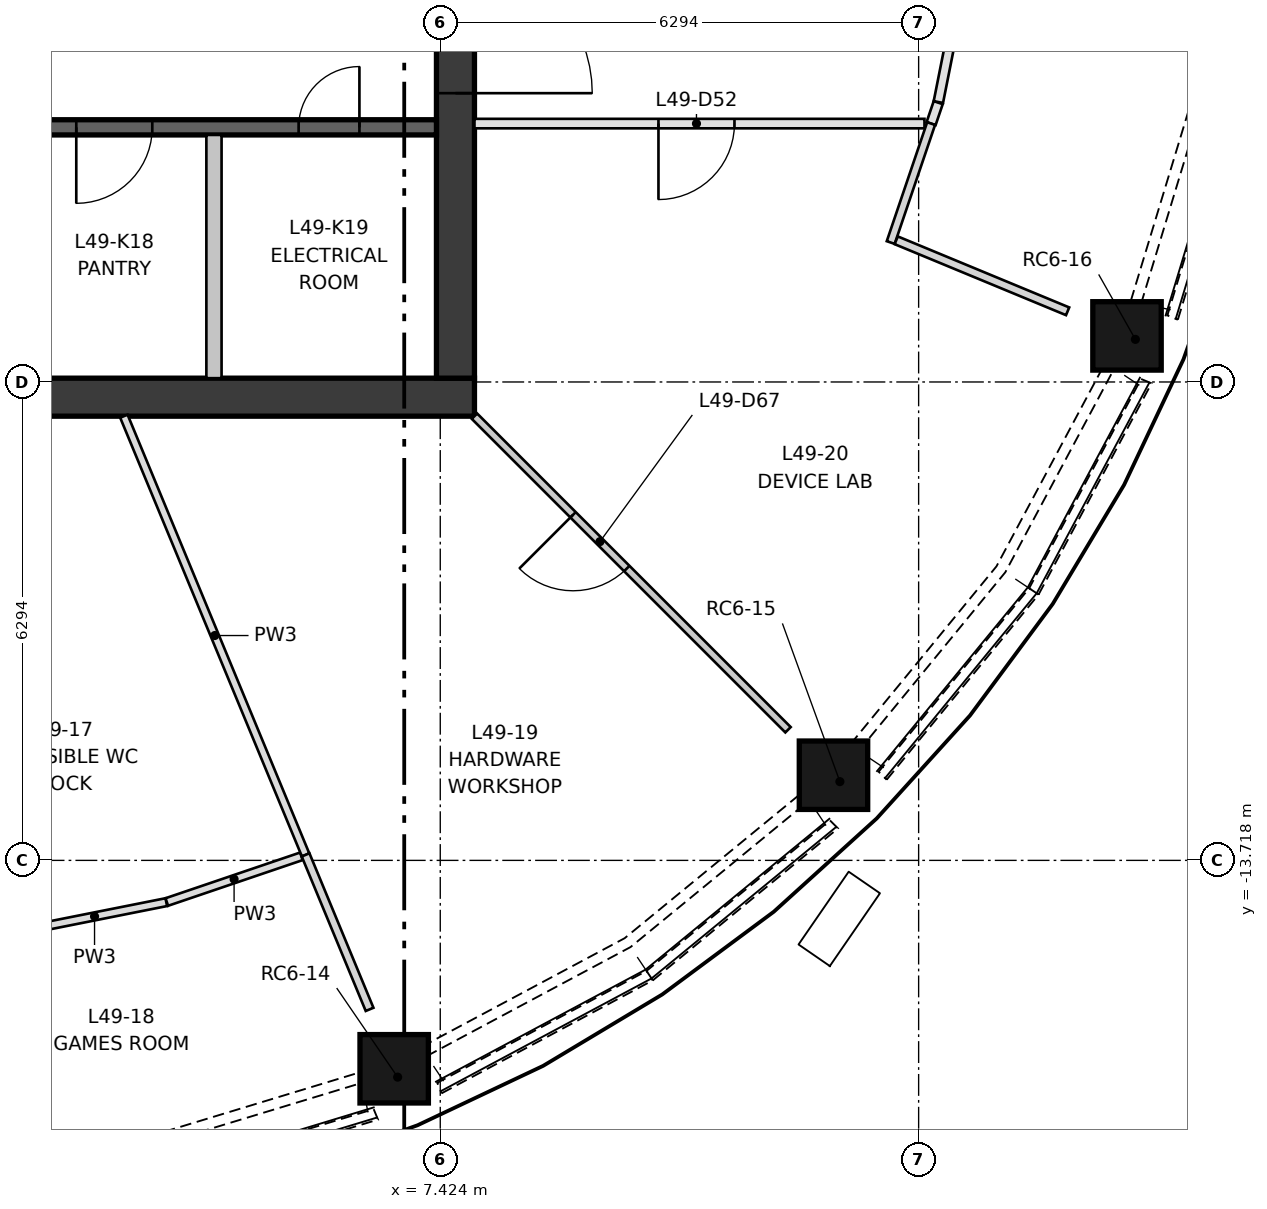
"""IFC4 building model, lengths in metres.
Left out: names, types, materials, properties, quantities, classifications, styles, units other than length and angle.
Written with IfcOpenShell. Run it as: python <this file> out.ifc"""

import sys

from ifc_helpers import new_model, si_unit, direction, frame, frame_2d, origin, origin_2d, place, context, subcontext, project, spatial, polyline, rectangle, outline, extrude, element, fill, save


model = new_model("IFC4")
c1 = context("Model", 3, precision=1e-05, world=origin(), true_north=direction((0.0, 1.0)))
c2 = subcontext(c1, "Body", "Model", "MODEL_VIEW")
j1 = project(units=[si_unit("LENGTHUNIT", "METRE"), si_unit("PLANEANGLEUNIT", "RADIAN")], contexts=[c1])
p1 = place(None, origin())
s1 = spatial("IfcSite", under=j1, at=p1, CompositionType="ELEMENT")
p2 = place(p1, origin())
s2 = spatial("IfcBuilding", under=s1, at=p2, CompositionType="ELEMENT")
p3 = place(p2, frame((0.0, 0.0, 184.3)))
s3 = spatial("IfcBuildingStorey", under=s2, at=p3, CompositionType="ELEMENT", Elevation=184.3)
p4 = place(p3, frame((6.863, -16.57, 0.5), z_axis=(0.0, 0.0, 1.0), x_axis=(-0.924120904221, -0.382100188932, 0.0)))
e1 = element("IfcColumn", 1, at=p4, inside=s3, PredefinedType="COLUMN", context=c2, shape_type="SweptSolid", body=[
    extrude(rectangle(XDim=0.9, YDim=0.9, at=origin_2d()), origin(), (0.0, -0.168, 0.986), 2.384),
])
p5 = place(p3, frame((12.682, -12.682, 0.5), z_axis=(0.0, 0.0, 1.0), x_axis=(-0.707106781187, -0.707106781187, 0.0)))
e2 = element("IfcColumn", 2, at=p5, inside=s3, PredefinedType="COLUMN", context=c2, shape_type="SweptSolid", body=[
    extrude(rectangle(XDim=0.9, YDim=0.9, at=origin_2d()), origin(), (0.0, -0.168, 0.986), 2.384),
])
p6 = place(p3, frame((16.57, -6.863, 0.5), z_axis=(0.0, 0.0, 1.0), x_axis=(-0.382100188932, -0.924120904221, 0.0)))
e3 = element("IfcColumn", 3, at=p6, inside=s3, PredefinedType="COLUMN", context=c2, shape_type="SweptSolid", body=[
    extrude(rectangle(XDim=0.9, YDim=0.9, at=origin_2d()), origin(), (0.0, -0.168, 0.986), 2.384),
])
p7 = place(p3, frame((-7.874, -7.624, 0.0), z_axis=(0.0, 0.0, 1.0), x_axis=(1.0, 0.0, 0.0)))
e4 = element("IfcWall", 4, at=p7, inside=s3, PredefinedType="SHEAR", context=c2, shape_type="SweptSolid", body=[
    extrude(rectangle(XDim=15.748, YDim=0.5, at=frame_2d((7.874, 0.0))), origin(), (0.0, 0.0, 1.0), 3.35),
])
p8 = place(p3, frame((7.624, -7.374, 0.0), z_axis=(0.0, 0.0, 1.0), x_axis=(0.0, 1.0, 0.0)))
e5 = element("IfcWall", 5, at=p8, inside=s3, PredefinedType="SHEAR", context=c2, shape_type="SweptSolid", body=[
    extrude(rectangle(XDim=14.748, YDim=0.5, at=frame_2d((7.374, 0.0))), origin(), (0.0, 0.0, 1.0), 3.35),
])
p9 = place(p8, frame((6.874, 0.0, 0.0)))
e6 = element("IfcOpeningElement", 6, at=p9, cuts=e5, PredefinedType="OPENING", context=c2, shape_type="SweptSolid", body=[
    extrude(rectangle(XDim=1.0, YDim=2.1, at=frame_2d((0.5, 1.05))), frame((0.0, 0.26, 0.0), z_axis=(0.0, -1.0, 0.0), x_axis=(1.0, 0.0, 0.0)), (0.0, 0.0, 1.0), 0.52),
])
p10 = place(p8, frame((3.75, 0.0, 0.0)))
e7 = element("IfcOpeningElement", 7, at=p10, cuts=e5, PredefinedType="OPENING", context=c2, shape_type="SweptSolid", body=[
    extrude(rectangle(XDim=1.8, YDim=2.1, at=frame_2d((0.9, 1.05))), frame((0.0, 0.26, 0.0), z_axis=(0.0, -1.0, 0.0), x_axis=(1.0, 0.0, 0.0)), (0.0, 0.0, 1.0), 0.52),
])
p11 = place(p8, frame((9.198, 0.0, 0.0)))
e8 = element("IfcOpeningElement", 8, at=p11, cuts=e5, PredefinedType="OPENING", context=c2, shape_type="SweptSolid", body=[
    extrude(rectangle(XDim=1.8, YDim=2.1, at=frame_2d((0.9, 1.05))), frame((0.0, 0.26, 0.0), z_axis=(0.0, -1.0, 0.0), x_axis=(1.0, 0.0, 0.0)), (0.0, 0.0, 1.0), 0.52),
])
p12 = place(p3, frame((-7.374, -4.074, 0.0), z_axis=(0.0, 0.0, 1.0), x_axis=(1.0, 0.0, 0.0)))
e9 = element("IfcWall", 9, at=p12, inside=s3, PredefinedType="SHEAR", context=c2, shape_type="SweptSolid", body=[
    extrude(rectangle(XDim=14.748, YDim=0.2, at=frame_2d((7.374, 0.0))), origin(), (0.0, 0.0, 1.0), 3.0),
])
p13 = place(p12, frame((1.319, 0.0, 0.0)))
e10 = element("IfcOpeningElement", 10, at=p13, cuts=e9, PredefinedType="OPENING", context=c2, shape_type="SweptSolid", body=[
    extrude(rectangle(XDim=1.1, YDim=2.1, at=frame_2d((0.55, 1.05))), frame((0.0, 0.11, 0.0), z_axis=(0.0, -1.0, 0.0), x_axis=(1.0, 0.0, 0.0)), (0.0, 0.0, 1.0), 0.22),
])
p14 = place(p12, frame((4.456, 0.0, 0.0)))
e11 = element("IfcOpeningElement", 11, at=p14, cuts=e9, PredefinedType="OPENING", context=c2, shape_type="SweptSolid", body=[
    extrude(rectangle(XDim=1.1, YDim=2.1, at=frame_2d((0.55, 1.05))), frame((0.0, 0.11, 0.0), z_axis=(0.0, -1.0, 0.0), x_axis=(1.0, 0.0, 0.0)), (0.0, 0.0, 1.0), 0.22),
])
p15 = place(p12, frame((7.386, 0.0, 0.0)))
e12 = element("IfcOpeningElement", 12, at=p15, cuts=e9, PredefinedType="OPENING", context=c2, shape_type="SweptSolid", body=[
    extrude(rectangle(XDim=1.0, YDim=2.1, at=frame_2d((0.5, 1.05))), frame((0.0, 0.11, 0.0), z_axis=(0.0, -1.0, 0.0), x_axis=(1.0, 0.0, 0.0)), (0.0, 0.0, 1.0), 0.22),
])
p16 = place(p12, frame((10.009, 0.0, 0.0)))
e13 = element("IfcOpeningElement", 13, at=p16, cuts=e9, PredefinedType="OPENING", context=c2, shape_type="SweptSolid", body=[
    extrude(rectangle(XDim=1.0, YDim=2.1, at=frame_2d((0.5, 1.05))), frame((0.0, 0.11, 0.0), z_axis=(0.0, -1.0, 0.0), x_axis=(1.0, 0.0, 0.0)), (0.0, 0.0, 1.0), 0.22),
])
p17 = place(p12, frame((12.934, 0.0, 0.0)))
e14 = element("IfcOpeningElement", 14, at=p17, cuts=e9, PredefinedType="OPENING", context=c2, shape_type="SweptSolid", body=[
    extrude(rectangle(XDim=0.8, YDim=2.1, at=frame_2d((0.4, 1.05))), frame((0.0, 0.11, 0.0), z_axis=(0.0, -1.0, 0.0), x_axis=(1.0, 0.0, 0.0)), (0.0, 0.0, 1.0), 0.22),
])
p18 = place(p3, frame((4.447, -7.374, 0.0), z_axis=(0.0, 0.0, 1.0), x_axis=(0.0, 1.0, 0.0)))
e15 = element("IfcWall", 15, at=p18, inside=s3, PredefinedType="PARTITIONING", context=c2, shape_type="SweptSolid", body=[
    extrude(rectangle(XDim=3.2, YDim=0.2, at=frame_2d((1.6, 0.0))), origin(), (0.0, 0.0, 1.0), 3.0),
])
p19 = place(p3, frame((3.59, -18.043, 0.0), z_axis=(0.286418531815, -0.944194299341, 0.162670064008), x_axis=(0.956940039415, 0.290285654048, 4.29464e-06)))
e16 = element("IfcWall", 16, at=p19, inside=s3, PredefinedType="SOLIDWALL", context=c2, shape_type="SweptSolid", body=[
    extrude(outline(polyline([(0.0, 0.0), (3.151, 5.551e-17), (3.137, 0.912), (0.014, 0.912), (0.0, 0.0)])), origin(), (0.0, 0.0, -1.0), 0.3),
])
p20 = place(p3, frame((7.441, -16.782, 0.0), z_axis=(0.465338838382, -0.870053087177, 0.162688017342), x_axis=(0.881801348468, 0.471621015005, -6.731272e-06)))
e17 = element("IfcWall", 17, at=p20, inside=s3, PredefinedType="SOLIDWALL", context=c2, shape_type="SweptSolid", body=[
    extrude(outline(polyline([(0.0, 0.0), (3.152, 2.776e-17), (3.137, 0.912), (0.015, 0.912), (0.0, 0.0)])), origin(), (0.0, 0.0, -1.0), 0.3),
])
p21 = place(p3, frame((10.221, -15.296, 0.0), z_axis=(0.625791219471, -0.762829436571, 0.162716318582), x_axis=(0.773132385109, 0.634244680745, 6.479811e-06)))
e18 = element("IfcWall", 18, at=p21, inside=s3, PredefinedType="SOLIDWALL", context=c2, shape_type="SweptSolid", body=[
    extrude(outline(polyline([(0.0, 0.0), (3.151, 0.0), (3.137, 0.912), (0.014, 0.912), (0.0, 0.0)])), origin(), (0.0, 0.0, -1.0), 0.3),
])
p22 = place(p3, frame((13.297, -12.657, 0.0), z_axis=(0.762803450932, -0.625801401555, 0.162798959018), x_axis=(0.634263258583, 0.773117144297, -2.518315e-06)))
e19 = element("IfcWall", 19, at=p22, inside=s3, PredefinedType="SOLIDWALL", context=c2, shape_type="SweptSolid", body=[
    extrude(outline(polyline([(0.0, 0.0), (3.151, 5.551e-17), (3.137, 0.912), (0.015, 0.912), (0.0, 0.0)])), origin(), (0.0, 0.0, -1.0), 0.3),
])
p23 = place(p3, frame((15.296, -10.221, 0.0), z_axis=(0.870053087177, -0.465338838382, 0.162688017342), x_axis=(0.471621015005, 0.881801348468, 6.731272e-06)))
e20 = element("IfcWall", 20, at=p23, inside=s3, PredefinedType="SOLIDWALL", context=c2, shape_type="SweptSolid", body=[
    extrude(outline(polyline([(0.0, 0.0), (3.152, -2.776e-17), (3.137, 0.912), (0.015, 0.912), (0.0, 0.0)])), origin(), (0.0, 0.0, -1.0), 0.3),
])
p24 = place(p3, frame((17.128, -6.605, 0.0), z_axis=(0.94416395345, -0.286447724297, 0.162794748846), x_axis=(0.290320348038, 0.956929514391, 1.683956e-06)))
e21 = element("IfcWall", 21, at=p24, inside=s3, PredefinedType="SOLIDWALL", context=c2, shape_type="SweptSolid", body=[
    extrude(outline(polyline([(0.0, 0.0), (3.151, 0.0), (3.137, 0.912), (0.014, 0.912), (0.0, 0.0)])), origin(), (0.0, 0.0, -1.0), 0.3),
])
p25 = place(p3, frame((13.976, -3.749, 0.0), z_axis=(0.0, 0.0, 1.0), x_axis=(-0.321511421405, -0.946905700641, 0.0)))
e22 = element("IfcWall", 22, at=p25, inside=s3, PredefinedType="PARTITIONING", context=c2, shape_type="SweptSolid", body=[
    extrude(rectangle(XDim=0.291, YDim=0.125, at=frame_2d((0.146, 0.0))), origin(), (0.0, 0.0, 1.0), 3.0),
])
p26 = place(p3, frame((14.345, -1.893, 0.0), z_axis=(0.0, 0.0, 1.0), x_axis=(-0.195069832264, -0.980789355846, 0.0)))
e23 = element("IfcWall", 23, at=p26, inside=s3, PredefinedType="PARTITIONING", context=c2, shape_type="SweptSolid", body=[
    extrude(rectangle(XDim=1.885, YDim=0.125, at=frame_2d((0.942, 0.0))), origin(), (0.0, 0.0, 1.0), 3.0),
])
p27 = place(p3, frame((13.795, -4.024, 0.0), z_axis=(0.0, 0.0, 1.0), x_axis=(-1.0, 0.0, 0.0)))
e24 = element("IfcWall", 24, at=p27, inside=s3, PredefinedType="PARTITIONING", context=c2, shape_type="SweptSolid", body=[
    extrude(rectangle(XDim=5.921, YDim=0.125, at=frame_2d((2.96, 0.0))), origin(), (0.0, 0.0, 1.0), 3.0),
])
p28 = place(p27, frame((2.5, 0.0, 0.0)))
e25 = element("IfcOpeningElement", 25, at=p28, cuts=e24, PredefinedType="OPENING", context=c2, shape_type="SweptSolid", body=[
    extrude(rectangle(XDim=1.0, YDim=2.1, at=frame_2d((0.5, 1.05))), frame((0.0, 0.073, 0.0), z_axis=(0.0, -1.0, 0.0), x_axis=(1.0, 0.0, 0.0)), (0.0, 0.0, 1.0), 0.145),
])
p29 = place(p3, frame((13.351, -5.59, 0.0), z_axis=(0.0, 0.0, 1.0), x_axis=(0.321407512479, 0.946940975416, 0.0)))
e26 = element("IfcWall", 26, at=p29, inside=s3, PredefinedType="PARTITIONING", context=c2, shape_type="SweptSolid", body=[
    extrude(rectangle(XDim=1.653, YDim=0.11, at=frame_2d((0.826, 0.0))), origin(), (0.0, 0.0, 1.0), 3.0),
])
p30 = place(p3, frame((15.678, -6.494, 0.0), z_axis=(0.0, 0.0, 1.0), x_axis=(-0.923862025559, 0.382725695152, 0.0)))
e27 = element("IfcWall", 27, at=p30, inside=s3, PredefinedType="PARTITIONING", context=c2, shape_type="SweptSolid", body=[
    extrude(rectangle(XDim=2.441, YDim=0.11, at=frame_2d((1.221, 0.0))), origin(), (0.0, 0.0, 1.0), 3.0),
])
p31 = place(p3, frame((3.819, -14.267, 0.0), z_axis=(0.0, 0.0, 1.0), x_axis=(-0.980789874999, -0.195067222003, 0.0)))
e28 = element("IfcWall", 28, at=p31, inside=s3, PredefinedType="PARTITIONING", context=c2, shape_type="SweptSolid", body=[
    extrude(rectangle(XDim=1.925, YDim=0.105, at=frame_2d((0.962, 0.0))), origin(), (0.0, 0.0, 1.0), 3.0),
])
p32 = place(p3, frame((5.597, -13.665, 0.0), z_axis=(0.0, 0.0, 1.0), x_axis=(-0.946919091427, -0.32147198057, 0.0)))
e29 = element("IfcWall", 29, at=p32, inside=s3, PredefinedType="PARTITIONING", context=c2, shape_type="SweptSolid", body=[
    extrude(rectangle(XDim=1.87, YDim=0.105, at=frame_2d((0.935, 0.0))), origin(), (0.0, 0.0, 1.0), 3.0),
])
p33 = place(p3, frame((3.261, -7.874, 0.0), z_axis=(0.0, 0.0, 1.0), x_axis=(0.382669328176, -0.923885374532, 0.0)))
e30 = element("IfcWall", 30, at=p33, inside=s3, PredefinedType="PARTITIONING", context=c2, shape_type="SweptSolid", body=[
    extrude(rectangle(XDim=6.247, YDim=0.105, at=frame_2d((3.124, 0.0))), origin(), (0.0, 0.0, 1.0), 3.0),
])
p34 = place(p3, frame((5.652, -13.646, 0.0), z_axis=(0.0, 0.0, 1.0), x_axis=(0.382747093259, -0.923853160736, 0.0)))
e31 = element("IfcWall", 31, at=p34, inside=s3, PredefinedType="PARTITIONING", context=c2, shape_type="SweptSolid", body=[
    extrude(rectangle(XDim=2.2, YDim=0.11, at=frame_2d((1.1, 0.0))), origin(), (0.0, 0.0, 1.0), 3.0),
])
p35 = place(p3, frame((12.0, -12.0, 0.0), z_axis=(0.0, 0.0, 1.0), x_axis=(-0.707106781187, 0.707106781187, 0.0)))
e32 = element("IfcWall", 32, at=p35, inside=s3, PredefinedType="PARTITIONING", context=c2, shape_type="SweptSolid", body=[
    extrude(rectangle(XDim=5.834, YDim=0.1, at=frame_2d((2.917, 0.0))), origin(), (0.0, 0.0, 1.0), 3.0),
])
p36 = place(p35, frame((3.0, 0.0, 0.0)))
e33 = element("IfcOpeningElement", 33, at=p36, cuts=e32, PredefinedType="OPENING", context=c2, shape_type="SweptSolid", body=[
    extrude(rectangle(XDim=1.0, YDim=2.1, at=frame_2d((0.5, 1.05))), frame((0.0, 0.06, 0.0), z_axis=(0.0, -1.0, 0.0), x_axis=(1.0, 0.0, 0.0)), (0.0, 0.0, 1.0), 0.12),
])
p37 = place(p16, frame((1.0, 0.0, 0.0), z_axis=(0.0, 0.0, 1.0), x_axis=(-1.0, 0.0, 0.0)))
e34 = element("IfcDoor", 34, at=p37, inside=s3, OperationType="SINGLE_SWING_LEFT", PredefinedType="DOOR", context=c2, shape_type="SweptSolid", body=[
    extrude(rectangle(XDim=1.0, YDim=2.1, at=frame_2d((0.5, 1.05))), frame((0.0, 0.025, 0.0), z_axis=(0.0, -1.0, 0.0), x_axis=(1.0, 0.0, 0.0)), (0.0, 0.0, 1.0), 0.05),
])
fill(e13, e34)
p38 = place(p17, origin())
e35 = element("IfcDoor", 35, at=p38, inside=s3, OperationType="SINGLE_SWING_RIGHT", PredefinedType="DOOR", context=c2, shape_type="SweptSolid", body=[
    extrude(rectangle(XDim=0.8, YDim=2.1, at=frame_2d((0.4, 1.05))), frame((0.0, 0.025, 0.0), z_axis=(0.0, -1.0, 0.0), x_axis=(1.0, 0.0, 0.0)), (0.0, 0.0, 1.0), 0.05),
])
fill(e14, e35)
p39 = place(p10, frame((1.8, 0.0, 0.0), z_axis=(0.0, 0.0, 1.0), x_axis=(-1.0, 0.0, 0.0)))
e36 = element("IfcDoor", 36, at=p39, inside=s3, OperationType="DOUBLE_DOOR_SINGLE_SWING", PredefinedType="DOOR", context=c2, shape_type="SweptSolid", body=[
    extrude(rectangle(XDim=1.8, YDim=2.1, at=frame_2d((0.9, 1.05))), frame((0.0, 0.025, 0.0), z_axis=(0.0, -1.0, 0.0), x_axis=(1.0, 0.0, 0.0)), (0.0, 0.0, 1.0), 0.05),
])
fill(e7, e36)
p40 = place(p28, origin())
e37 = element("IfcDoor", 37, at=p40, inside=s3, OperationType="SINGLE_SWING_RIGHT", PredefinedType="DOOR", context=c2, shape_type="SweptSolid", body=[
    extrude(rectangle(XDim=1.0, YDim=2.1, at=frame_2d((0.5, 1.05))), frame((0.0, 0.025, 0.0), z_axis=(0.0, -1.0, 0.0), x_axis=(1.0, 0.0, 0.0)), (0.0, 0.0, 1.0), 0.05),
])
fill(e25, e37)
p41 = place(p36, origin())
e38 = element("IfcDoor", 38, at=p41, inside=s3, OperationType="SINGLE_SWING_RIGHT", PredefinedType="DOOR", context=c2, shape_type="SweptSolid", body=[
    extrude(rectangle(XDim=1.0, YDim=2.1, at=frame_2d((0.5, 1.05))), frame((0.0, 0.025, 0.0), z_axis=(0.0, -1.0, 0.0), x_axis=(1.0, 0.0, 0.0)), (0.0, 0.0, 1.0), 0.05),
])
fill(e33, e38)
save(model, sys.argv[1])
